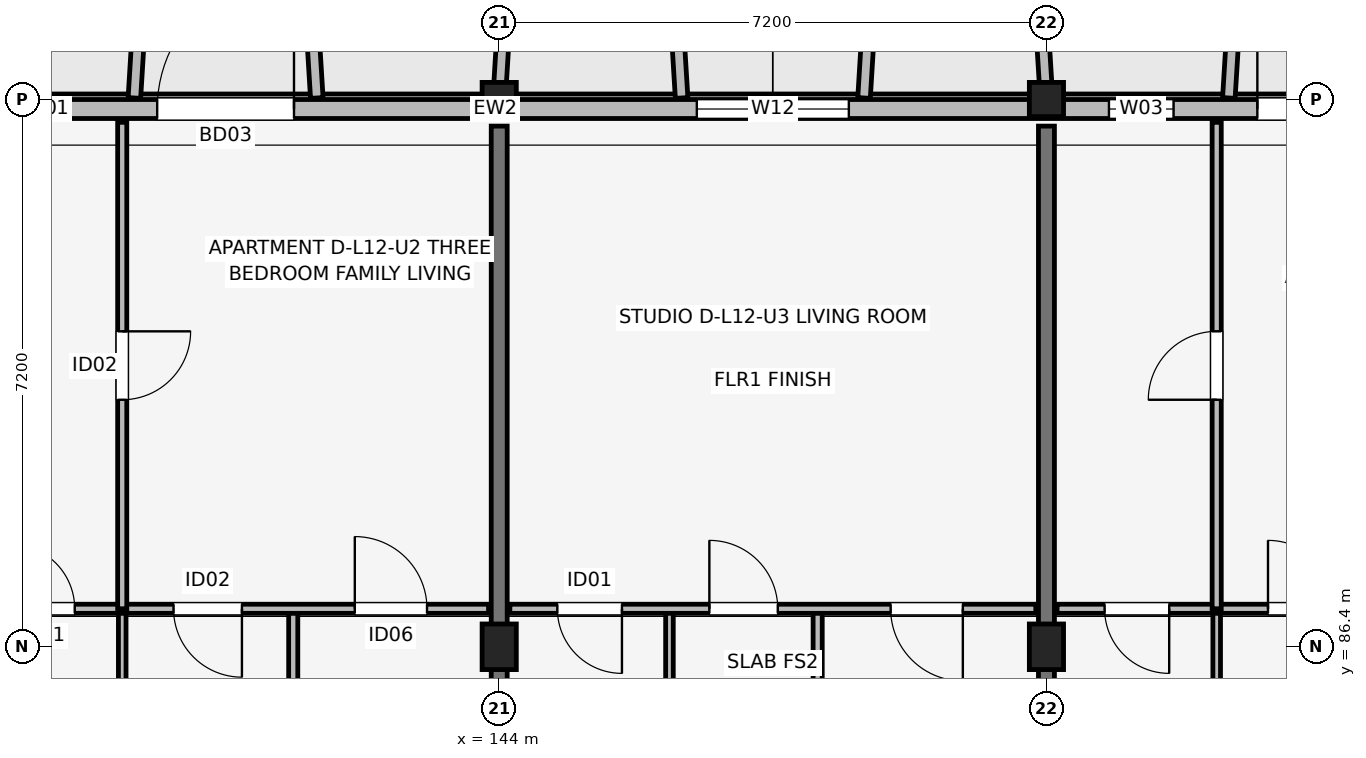
"""IFC4 building model, lengths in metres.
Left out: names, types, materials, properties, quantities, classifications, styles, units other than length and angle.
Written with IfcOpenShell. Run it as: python <this file> out.ifc"""

import sys

from ifc_helpers import new_model, si_unit, direction, frame, frame_2d, origin, origin_2d, place, context, subcontext, project, spatial, rectangle, extrude, element, fill, save


model = new_model("IFC4")
c1 = context("Model", 3, precision=1e-05, world=origin(), true_north=direction((0.0, 1.0)))
c2 = subcontext(c1, "Body", "Model", "MODEL_VIEW")
j1 = project(units=[si_unit("LENGTHUNIT", "METRE"), si_unit("PLANEANGLEUNIT", "RADIAN")], contexts=[c1])
p1 = place(None, origin())
s1 = spatial("IfcSite", under=j1, at=p1, CompositionType="ELEMENT")
p2 = place(p1, origin())
s2 = spatial("IfcBuilding", under=s1, at=p2, CompositionType="ELEMENT")
p3 = place(p2, frame((0.0, 0.0, 40.2)))
s3 = spatial("IfcBuildingStorey", under=s2, at=p3, CompositionType="ELEMENT", Elevation=40.2)
p4 = place(p3, frame((144.0, 86.4, 0.0), z_axis=(0.0, 0.0, 1.0), x_axis=(1.0, 0.0, 0.0)))
e1 = element("IfcColumn", 1, at=p4, inside=s3, PredefinedType="COLUMN", context=c2, shape_type="SweptSolid", body=[
    extrude(rectangle(XDim=0.45, YDim=0.6, at=origin_2d()), origin(), (0.0, 0.0, 1.0), 3.15),
])
p5 = place(p3, frame((144.0, 93.6, 0.0), z_axis=(0.0, 0.0, 1.0), x_axis=(1.0, 0.0, 0.0)))
e2 = element("IfcColumn", 2, at=p5, inside=s3, PredefinedType="COLUMN", context=c2, shape_type="SweptSolid", body=[
    extrude(rectangle(XDim=0.45, YDim=0.45, at=origin_2d()), origin(), (0.0, 0.0, 1.0), 3.15),
])
p6 = place(p3, frame((151.2, 86.4, 0.0), z_axis=(0.0, 0.0, 1.0), x_axis=(1.0, 0.0, 0.0)))
e3 = element("IfcColumn", 3, at=p6, inside=s3, PredefinedType="COLUMN", context=c2, shape_type="SweptSolid", body=[
    extrude(rectangle(XDim=0.45, YDim=0.6, at=origin_2d()), origin(), (0.0, 0.0, 1.0), 3.15),
])
p7 = place(p3, frame((151.2, 93.6, 0.0), z_axis=(0.0, 0.0, 1.0), x_axis=(1.0, 0.0, 0.0)))
e4 = element("IfcColumn", 4, at=p7, inside=s3, PredefinedType="COLUMN", context=c2, shape_type="SweptSolid", body=[
    extrude(rectangle(XDim=0.45, YDim=0.45, at=origin_2d()), origin(), (0.0, 0.0, 1.0), 3.15),
])
for number, where, z_axis, x_axis in (
    (5, (144.0, 83.85, 0.0), (0.0, 0.0, 1.0), (0.0, 1.0, 0.0)),
    (6, (151.2, 83.85, 0.0), (0.0, 0.0, 1.0), (0.0, 1.0, 0.0)),
):
    element("IfcWall", number, at=place(p3, frame(where, z_axis=z_axis, x_axis=x_axis)), inside=s3, PredefinedType="SHEAR", context=c2, shape_type="SweptSolid", body=[
        extrude(rectangle(XDim=9.4, YDim=0.21, at=frame_2d((4.7, 0.0))), origin(), (0.0, 0.0, 1.0), 3.15),
    ])
p8 = place(p3, frame((162.8, 93.475, 0.0), z_axis=(0.0, 0.0, 1.0), x_axis=(-1.0, 0.0, 0.0)))
e7 = element("IfcWall", 7, at=p8, inside=s3, PredefinedType="SOLIDWALL", context=c2, shape_type="SweptSolid", body=[
    extrude(rectangle(XDim=30.4, YDim=0.25, at=frame_2d((15.2, 0.0))), origin(), (0.0, 0.0, 1.0), 2.48),
])
p9 = place(p8, frame((23.3, 0.0, 0.0), z_axis=(0.0, 0.0, 1.0), x_axis=(-1.0, 0.0, 0.0)))
e8 = element("IfcOpeningElement", 8, at=p9, cuts=e7, PredefinedType="OPENING", context=c2, shape_type="SweptSolid", body=[
    extrude(rectangle(XDim=1.8, YDim=2.15, at=frame_2d((0.9, 1.075))), frame((0.0, 0.135, 0.0), z_axis=(0.0, -1.0, 0.0), x_axis=(1.0, 0.0, 0.0)), (0.0, 0.0, 1.0), 0.27),
])
p10 = place(p8, frame((8.825, 0.0, 0.0), z_axis=(0.0, 0.0, 1.0), x_axis=(-1.0, 0.0, 0.0)))
e9 = element("IfcOpeningElement", 9, at=p10, cuts=e7, PredefinedType="OPENING", context=c2, shape_type="SweptSolid", body=[
    extrude(rectangle(XDim=1.65, YDim=2.15, at=frame_2d((0.825, 1.075))), frame((0.0, 0.135, 0.0), z_axis=(0.0, -1.0, 0.0), x_axis=(1.0, 0.0, 0.0)), (0.0, 0.0, 1.0), 0.27),
])
p11 = place(p8, frame((26.603, 0.0, 0.75)))
e10 = element("IfcOpeningElement", 10, at=p11, cuts=e7, PredefinedType="OPENING", context=c2, shape_type="SweptSolid", body=[
    extrude(rectangle(XDim=1.46, YDim=1.55, at=frame_2d((0.73, 0.775))), frame((0.0, 0.135, 0.0), z_axis=(0.0, -1.0, 0.0), x_axis=(1.0, 0.0, 0.0)), (0.0, 0.0, 1.0), 0.27),
])
p12 = place(p8, frame((24.452, 0.0, 0.75)))
e11 = element("IfcOpeningElement", 11, at=p12, cuts=e7, PredefinedType="OPENING", context=c2, shape_type="SweptSolid", body=[
    extrude(rectangle(XDim=0.6, YDim=1.25, at=frame_2d((0.3, 0.625))), frame((0.0, 0.135, 0.0), z_axis=(0.0, -1.0, 0.0), x_axis=(1.0, 0.0, 0.0)), (0.0, 0.0, 1.0), 0.27),
])
p13 = place(p8, frame((14.2, 0.0, 0.7)))
e12 = element("IfcOpeningElement", 12, at=p13, cuts=e7, PredefinedType="OPENING", context=c2, shape_type="SweptSolid", body=[
    extrude(rectangle(XDim=2.0, YDim=1.65, at=frame_2d((1.0, 0.825))), frame((0.0, 0.135, 0.0), z_axis=(0.0, -1.0, 0.0), x_axis=(1.0, 0.0, 0.0)), (0.0, 0.0, 1.0), 0.27),
])
p14 = place(p8, frame((9.927, 0.0, 0.75)))
e13 = element("IfcOpeningElement", 13, at=p14, cuts=e7, PredefinedType="OPENING", context=c2, shape_type="SweptSolid", body=[
    extrude(rectangle(XDim=0.85, YDim=1.4, at=frame_2d((0.425, 0.7))), frame((0.0, 0.135, 0.0), z_axis=(0.0, -1.0, 0.0), x_axis=(1.0, 0.0, 0.0)), (0.0, 0.0, 1.0), 0.27),
])
p15 = place(p8, frame((2.137, 0.0, 0.7)))
e14 = element("IfcOpeningElement", 14, at=p15, cuts=e7, PredefinedType="OPENING", context=c2, shape_type="SweptSolid", body=[
    extrude(rectangle(XDim=1.86, YDim=1.6, at=frame_2d((0.93, 0.8))), frame((0.0, 0.135, 0.0), z_axis=(0.0, -1.0, 0.0), x_axis=(1.0, 0.0, 0.0)), (0.0, 0.0, 1.0), 0.27),
])
for number, where, z_axis, x_axis in (
    (15, (139.2, 93.62, 0.0), (0.0, 0.0, 1.0), (0.061, 0.998, 0.0)),
    (16, (141.6, 93.62, 0.0), (0.0, 0.0, 1.0), (-0.061, 0.998, 0.0)),
):
    element("IfcWall", number, at=place(p3, frame(where, z_axis=z_axis, x_axis=x_axis)), inside=s3, PredefinedType="ELEMENTEDWALL", context=c2, shape_type="SweptSolid", body=[
        extrude(rectangle(XDim=1.964, YDim=0.165, at=frame_2d((0.982, 0.0))), origin(), (0.0, 0.0, 1.0), 2.58),
    ])
for number, where, z_axis, x_axis in (
    (17, (144.0, 93.62, 0.0), (0.0, 0.0, 1.0), (0.061, 0.998, 0.0)),
    (18, (146.4, 93.62, 0.0), (0.0, 0.0, 1.0), (-0.061, 0.998, 0.0)),
    (19, (148.8, 93.62, 0.0), (0.0, 0.0, 1.0), (0.061, 0.998, 0.0)),
    (20, (151.2, 93.62, 0.0), (0.0, 0.0, 1.0), (-0.061, 0.998, 0.0)),
):
    element("IfcWall", number, at=place(p3, frame(where, z_axis=z_axis, x_axis=x_axis)), inside=s3, PredefinedType="ELEMENTEDWALL", context=c2, shape_type="SweptSolid", body=[
        extrude(rectangle(XDim=1.964, YDim=0.165, at=frame_2d((0.982, 0.0))), origin(), (0.0, 0.0, 1.0), 2.53),
    ])
p16 = place(p3, frame((153.6, 93.62, 0.0), z_axis=(0.0, 0.0, 1.0), x_axis=(0.061046865508, 0.998134900808, 0.0)))
e21 = element("IfcWall", 21, at=p16, inside=s3, PredefinedType="ELEMENTEDWALL", context=c2, shape_type="SweptSolid", body=[
    extrude(rectangle(XDim=1.964, YDim=0.165, at=frame_2d((0.982, 0.0))), origin(), (0.0, 0.0, 1.0), 2.48),
])
p17 = place(p3, frame((139.04, 83.7, 0.0), z_axis=(0.0, 0.0, 1.0), x_axis=(0.0, 1.0, 0.0)))
e22 = element("IfcWall", 22, at=p17, inside=s3, PredefinedType="PARTITIONING", context=c2, shape_type="SweptSolid", body=[
    extrude(rectangle(XDim=3.2, YDim=0.1, at=frame_2d((1.6, 0.0))), origin(), (0.0, 0.0, 1.0), 2.38),
])
p18 = place(p3, frame((141.29, 83.7, 0.0), z_axis=(0.0, 0.0, 1.0), x_axis=(0.0, 1.0, 0.0)))
e23 = element("IfcWall", 23, at=p18, inside=s3, PredefinedType="PARTITIONING", context=c2, shape_type="SweptSolid", body=[
    extrude(rectangle(XDim=3.2, YDim=0.12, at=frame_2d((1.6, 0.0))), origin(), (0.0, 0.0, 1.0), 2.38),
])
p19 = place(p3, frame((136.94, 86.9, 0.0), z_axis=(0.0, 0.0, 1.0), x_axis=(1.0, 0.0, 0.0)))
e24 = element("IfcWall", 24, at=p19, inside=s3, PredefinedType="PARTITIONING", context=c2, shape_type="SweptSolid", body=[
    extrude(rectangle(XDim=6.92, YDim=0.12, at=frame_2d((3.46, 0.0))), origin(), (0.0, 0.0, 1.0), 2.38),
])
p20 = place(p19, frame((0.625, 0.0, 0.0)))
e25 = element("IfcOpeningElement", 25, at=p20, cuts=e24, PredefinedType="OPENING", context=c2, shape_type="SweptSolid", body=[
    extrude(rectangle(XDim=0.85, YDim=2.08, at=frame_2d((0.425, 1.04))), frame((0.0, 0.07, 0.0), z_axis=(0.0, -1.0, 0.0), x_axis=(1.0, 0.0, 0.0)), (0.0, 0.0, 1.0), 0.14),
])
p21 = place(p19, frame((3.675, 0.0, 0.0), z_axis=(0.0, 0.0, 1.0), x_axis=(-1.0, 0.0, 0.0)))
e26 = element("IfcOpeningElement", 26, at=p21, cuts=e24, PredefinedType="OPENING", context=c2, shape_type="SweptSolid", body=[
    extrude(rectangle(XDim=0.9, YDim=2.08, at=frame_2d((0.45, 1.04))), frame((0.0, 0.07, 0.0), z_axis=(0.0, -1.0, 0.0), x_axis=(1.0, 0.0, 0.0)), (0.0, 0.0, 1.0), 0.14),
])
p22 = place(p19, frame((5.16, 0.0, 0.0)))
e27 = element("IfcOpeningElement", 27, at=p22, cuts=e24, PredefinedType="OPENING", context=c2, shape_type="SweptSolid", body=[
    extrude(rectangle(XDim=0.95, YDim=2.08, at=frame_2d((0.475, 1.04))), frame((0.0, 0.07, 0.0), z_axis=(0.0, -1.0, 0.0), x_axis=(1.0, 0.0, 0.0)), (0.0, 0.0, 1.0), 0.14),
])
p23 = place(p3, frame((139.04, 86.9, 0.0), z_axis=(0.0, 0.0, 1.0), x_axis=(0.0, 1.0, 0.0)))
e28 = element("IfcWall", 28, at=p23, inside=s3, PredefinedType="PARTITIONING", context=c2, shape_type="SweptSolid", body=[
    extrude(rectangle(XDim=6.4, YDim=0.12, at=frame_2d((3.2, 0.0))), origin(), (0.0, 0.0, 1.0), 2.38),
])
p24 = place(p23, frame((3.65, 0.0, 0.0), z_axis=(0.0, 0.0, 1.0), x_axis=(-1.0, 0.0, 0.0)))
e29 = element("IfcOpeningElement", 29, at=p24, cuts=e28, PredefinedType="OPENING", context=c2, shape_type="SweptSolid", body=[
    extrude(rectangle(XDim=0.9, YDim=2.08, at=frame_2d((0.45, 1.04))), frame((0.0, 0.07, 0.0), z_axis=(0.0, -1.0, 0.0), x_axis=(1.0, 0.0, 0.0)), (0.0, 0.0, 1.0), 0.14),
])
p25 = place(p3, frame((146.24, 83.7, 0.0), z_axis=(0.0, 0.0, 1.0), x_axis=(0.0, 1.0, 0.0)))
e30 = element("IfcWall", 30, at=p25, inside=s3, PredefinedType="PARTITIONING", context=c2, shape_type="SweptSolid", body=[
    extrude(rectangle(XDim=3.2, YDim=0.1, at=frame_2d((1.6, 0.0))), origin(), (0.0, 0.0, 1.0), 2.38),
])
p26 = place(p3, frame((148.19, 83.7, 0.0), z_axis=(0.0, 0.0, 1.0), x_axis=(0.0, 1.0, 0.0)))
e31 = element("IfcWall", 31, at=p26, inside=s3, PredefinedType="PARTITIONING", context=c2, shape_type="SweptSolid", body=[
    extrude(rectangle(XDim=3.2, YDim=0.12, at=frame_2d((1.6, 0.0))), origin(), (0.0, 0.0, 1.0), 2.38),
])
p27 = place(p3, frame((144.14, 86.9, 0.0), z_axis=(0.0, 0.0, 1.0), x_axis=(1.0, 0.0, 0.0)))
e32 = element("IfcWall", 32, at=p27, inside=s3, PredefinedType="PARTITIONING", context=c2, shape_type="SweptSolid", body=[
    extrude(rectangle(XDim=6.92, YDim=0.12, at=frame_2d((3.46, 0.0))), origin(), (0.0, 0.0, 1.0), 2.38),
])
p28 = place(p27, frame((1.475, 0.0, 0.0), z_axis=(0.0, 0.0, 1.0), x_axis=(-1.0, 0.0, 0.0)))
e33 = element("IfcOpeningElement", 33, at=p28, cuts=e32, PredefinedType="OPENING", context=c2, shape_type="SweptSolid", body=[
    extrude(rectangle(XDim=0.85, YDim=2.08, at=frame_2d((0.425, 1.04))), frame((0.0, 0.07, 0.0), z_axis=(0.0, -1.0, 0.0), x_axis=(1.0, 0.0, 0.0)), (0.0, 0.0, 1.0), 0.14),
])
p29 = place(p27, frame((2.625, 0.0, 0.0)))
e34 = element("IfcOpeningElement", 34, at=p29, cuts=e32, PredefinedType="OPENING", context=c2, shape_type="SweptSolid", body=[
    extrude(rectangle(XDim=0.9, YDim=2.08, at=frame_2d((0.45, 1.04))), frame((0.0, 0.07, 0.0), z_axis=(0.0, -1.0, 0.0), x_axis=(1.0, 0.0, 0.0)), (0.0, 0.0, 1.0), 0.14),
])
p30 = place(p27, frame((5.96, 0.0, 0.0), z_axis=(0.0, 0.0, 1.0), x_axis=(-1.0, 0.0, 0.0)))
e35 = element("IfcOpeningElement", 35, at=p30, cuts=e32, PredefinedType="OPENING", context=c2, shape_type="SweptSolid", body=[
    extrude(rectangle(XDim=0.95, YDim=2.08, at=frame_2d((0.475, 1.04))), frame((0.0, 0.07, 0.0), z_axis=(0.0, -1.0, 0.0), x_axis=(1.0, 0.0, 0.0)), (0.0, 0.0, 1.0), 0.14),
])
p31 = place(p3, frame((153.44, 83.7, 0.0), z_axis=(0.0, 0.0, 1.0), x_axis=(0.0, 1.0, 0.0)))
e36 = element("IfcWall", 36, at=p31, inside=s3, PredefinedType="PARTITIONING", context=c2, shape_type="SweptSolid", body=[
    extrude(rectangle(XDim=3.2, YDim=0.1, at=frame_2d((1.6, 0.0))), origin(), (0.0, 0.0, 1.0), 2.38),
])
p32 = place(p3, frame((151.34, 86.9, 0.0), z_axis=(0.0, 0.0, 1.0), x_axis=(1.0, 0.0, 0.0)))
e37 = element("IfcWall", 37, at=p32, inside=s3, PredefinedType="PARTITIONING", context=c2, shape_type="SweptSolid", body=[
    extrude(rectangle(XDim=6.92, YDim=0.12, at=frame_2d((3.46, 0.0))), origin(), (0.0, 0.0, 1.0), 2.38),
])
p33 = place(p32, frame((1.475, 0.0, 0.0), z_axis=(0.0, 0.0, 1.0), x_axis=(-1.0, 0.0, 0.0)))
e38 = element("IfcOpeningElement", 38, at=p33, cuts=e37, PredefinedType="OPENING", context=c2, shape_type="SweptSolid", body=[
    extrude(rectangle(XDim=0.85, YDim=2.08, at=frame_2d((0.425, 1.04))), frame((0.0, 0.07, 0.0), z_axis=(0.0, -1.0, 0.0), x_axis=(1.0, 0.0, 0.0)), (0.0, 0.0, 1.0), 0.14),
])
p34 = place(p32, frame((2.775, 0.0, 0.0)))
e39 = element("IfcOpeningElement", 39, at=p34, cuts=e37, PredefinedType="OPENING", context=c2, shape_type="SweptSolid", body=[
    extrude(rectangle(XDim=0.9, YDim=2.08, at=frame_2d((0.45, 1.04))), frame((0.0, 0.07, 0.0), z_axis=(0.0, -1.0, 0.0), x_axis=(1.0, 0.0, 0.0)), (0.0, 0.0, 1.0), 0.14),
])
p35 = place(p32, frame((6.11, 0.0, 0.0), z_axis=(0.0, 0.0, 1.0), x_axis=(-1.0, 0.0, 0.0)))
e40 = element("IfcOpeningElement", 40, at=p35, cuts=e37, PredefinedType="OPENING", context=c2, shape_type="SweptSolid", body=[
    extrude(rectangle(XDim=0.95, YDim=2.08, at=frame_2d((0.475, 1.04))), frame((0.0, 0.07, 0.0), z_axis=(0.0, -1.0, 0.0), x_axis=(1.0, 0.0, 0.0)), (0.0, 0.0, 1.0), 0.14),
])
p36 = place(p3, frame((153.44, 86.9, 0.0), z_axis=(0.0, 0.0, 1.0), x_axis=(0.0, 1.0, 0.0)))
e41 = element("IfcWall", 41, at=p36, inside=s3, PredefinedType="PARTITIONING", context=c2, shape_type="SweptSolid", body=[
    extrude(rectangle(XDim=6.4, YDim=0.12, at=frame_2d((3.2, 0.0))), origin(), (0.0, 0.0, 1.0), 2.38),
])
p37 = place(p36, frame((2.75, 0.0, 0.0)))
e42 = element("IfcOpeningElement", 42, at=p37, cuts=e41, PredefinedType="OPENING", context=c2, shape_type="SweptSolid", body=[
    extrude(rectangle(XDim=0.9, YDim=2.08, at=frame_2d((0.45, 1.04))), frame((0.0, 0.07, 0.0), z_axis=(0.0, -1.0, 0.0), x_axis=(1.0, 0.0, 0.0)), (0.0, 0.0, 1.0), 0.14),
])
p38 = place(p9, origin())
e43 = element("IfcDoor", 43, at=p38, inside=s3, OperationType="SINGLE_SWING_LEFT", PredefinedType="DOOR", context=c2, shape_type="SweptSolid", body=[
    extrude(rectangle(XDim=1.8, YDim=2.15, at=frame_2d((0.9, 1.075))), frame((0.0, 0.025, 0.0), z_axis=(0.0, -1.0, 0.0), x_axis=(1.0, 0.0, 0.0)), (0.0, 0.0, 1.0), 0.05),
])
fill(e8, e43)
p39 = place(p10, origin())
e44 = element("IfcDoor", 44, at=p39, inside=s3, OperationType="SINGLE_SWING_RIGHT", PredefinedType="DOOR", context=c2, shape_type="SweptSolid", body=[
    extrude(rectangle(XDim=1.65, YDim=2.15, at=frame_2d((0.825, 1.075))), frame((0.0, 0.025, 0.0), z_axis=(0.0, -1.0, 0.0), x_axis=(1.0, 0.0, 0.0)), (0.0, 0.0, 1.0), 0.05),
])
fill(e9, e44)
p40 = place(p12, origin())
e45 = element("IfcWindow", 45, at=p40, inside=s3, PartitioningType="SINGLE_PANEL", PredefinedType="WINDOW", context=c2, shape_type="SweptSolid", body=[
    extrude(rectangle(XDim=0.6, YDim=1.25, at=frame_2d((0.3, 0.625))), frame((0.0, 0.03, 0.0), z_axis=(0.0, -1.0, 0.0), x_axis=(1.0, 0.0, 0.0)), (0.0, 0.0, 1.0), 0.06),
])
fill(e11, e45)
p41 = place(p13, origin())
e46 = element("IfcWindow", 46, at=p41, inside=s3, PartitioningType="SINGLE_PANEL", PredefinedType="WINDOW", context=c2, shape_type="SweptSolid", body=[
    extrude(rectangle(XDim=2.0, YDim=1.65, at=frame_2d((1.0, 0.825))), frame((0.0, 0.03, 0.0), z_axis=(0.0, -1.0, 0.0), x_axis=(1.0, 0.0, 0.0)), (0.0, 0.0, 1.0), 0.06),
])
fill(e12, e46)
p42 = place(p14, origin())
e47 = element("IfcWindow", 47, at=p42, inside=s3, PartitioningType="SINGLE_PANEL", PredefinedType="WINDOW", context=c2, shape_type="SweptSolid", body=[
    extrude(rectangle(XDim=0.85, YDim=1.4, at=frame_2d((0.425, 0.7))), frame((0.0, 0.03, 0.0), z_axis=(0.0, -1.0, 0.0), x_axis=(1.0, 0.0, 0.0)), (0.0, 0.0, 1.0), 0.06),
])
fill(e13, e47)
p43 = place(p20, origin())
e48 = element("IfcDoor", 48, at=p43, inside=s3, OperationType="SINGLE_SWING_LEFT", PredefinedType="DOOR", context=c2, shape_type="SweptSolid", body=[
    extrude(rectangle(XDim=0.85, YDim=2.08, at=frame_2d((0.425, 1.04))), frame((0.0, 0.025, 0.0), z_axis=(0.0, -1.0, 0.0), x_axis=(1.0, 0.0, 0.0)), (0.0, 0.0, 1.0), 0.05),
])
fill(e25, e48)
p44 = place(p21, origin())
e49 = element("IfcDoor", 49, at=p44, inside=s3, OperationType="SINGLE_SWING_RIGHT", PredefinedType="DOOR", context=c2, shape_type="SweptSolid", body=[
    extrude(rectangle(XDim=0.9, YDim=2.08, at=frame_2d((0.45, 1.04))), frame((0.0, 0.025, 0.0), z_axis=(0.0, -1.0, 0.0), x_axis=(1.0, 0.0, 0.0)), (0.0, 0.0, 1.0), 0.05),
])
fill(e26, e49)
p45 = place(p22, origin())
e50 = element("IfcDoor", 50, at=p45, inside=s3, OperationType="SINGLE_SWING_LEFT", PredefinedType="DOOR", context=c2, shape_type="SweptSolid", body=[
    extrude(rectangle(XDim=0.95, YDim=2.08, at=frame_2d((0.475, 1.04))), frame((0.0, 0.025, 0.0), z_axis=(0.0, -1.0, 0.0), x_axis=(1.0, 0.0, 0.0)), (0.0, 0.0, 1.0), 0.05),
])
fill(e27, e50)
p46 = place(p24, origin())
e51 = element("IfcDoor", 51, at=p46, inside=s3, OperationType="SINGLE_SWING_RIGHT", PredefinedType="DOOR", context=c2, shape_type="SweptSolid", body=[
    extrude(rectangle(XDim=0.9, YDim=2.08, at=frame_2d((0.45, 1.04))), frame((0.0, 0.025, 0.0), z_axis=(0.0, -1.0, 0.0), x_axis=(1.0, 0.0, 0.0)), (0.0, 0.0, 1.0), 0.05),
])
fill(e29, e51)
p47 = place(p28, origin())
e52 = element("IfcDoor", 52, at=p47, inside=s3, OperationType="SINGLE_SWING_RIGHT", PredefinedType="DOOR", context=c2, shape_type="SweptSolid", body=[
    extrude(rectangle(XDim=0.85, YDim=2.08, at=frame_2d((0.425, 1.04))), frame((0.0, 0.025, 0.0), z_axis=(0.0, -1.0, 0.0), x_axis=(1.0, 0.0, 0.0)), (0.0, 0.0, 1.0), 0.05),
])
fill(e33, e52)
p48 = place(p29, origin())
e53 = element("IfcDoor", 53, at=p48, inside=s3, OperationType="SINGLE_SWING_LEFT", PredefinedType="DOOR", context=c2, shape_type="SweptSolid", body=[
    extrude(rectangle(XDim=0.9, YDim=2.08, at=frame_2d((0.45, 1.04))), frame((0.0, 0.025, 0.0), z_axis=(0.0, -1.0, 0.0), x_axis=(1.0, 0.0, 0.0)), (0.0, 0.0, 1.0), 0.05),
])
fill(e34, e53)
p49 = place(p30, origin())
e54 = element("IfcDoor", 54, at=p49, inside=s3, OperationType="SINGLE_SWING_RIGHT", PredefinedType="DOOR", context=c2, shape_type="SweptSolid", body=[
    extrude(rectangle(XDim=0.95, YDim=2.08, at=frame_2d((0.475, 1.04))), frame((0.0, 0.025, 0.0), z_axis=(0.0, -1.0, 0.0), x_axis=(1.0, 0.0, 0.0)), (0.0, 0.0, 1.0), 0.05),
])
fill(e35, e54)
p50 = place(p33, origin())
e55 = element("IfcDoor", 55, at=p50, inside=s3, OperationType="SINGLE_SWING_RIGHT", PredefinedType="DOOR", context=c2, shape_type="SweptSolid", body=[
    extrude(rectangle(XDim=0.85, YDim=2.08, at=frame_2d((0.425, 1.04))), frame((0.0, 0.025, 0.0), z_axis=(0.0, -1.0, 0.0), x_axis=(1.0, 0.0, 0.0)), (0.0, 0.0, 1.0), 0.05),
])
fill(e38, e55)
p51 = place(p34, origin())
e56 = element("IfcDoor", 56, at=p51, inside=s3, OperationType="SINGLE_SWING_LEFT", PredefinedType="DOOR", context=c2, shape_type="SweptSolid", body=[
    extrude(rectangle(XDim=0.9, YDim=2.08, at=frame_2d((0.45, 1.04))), frame((0.0, 0.025, 0.0), z_axis=(0.0, -1.0, 0.0), x_axis=(1.0, 0.0, 0.0)), (0.0, 0.0, 1.0), 0.05),
])
fill(e39, e56)
p52 = place(p37, origin())
e57 = element("IfcDoor", 57, at=p52, inside=s3, OperationType="SINGLE_SWING_LEFT", PredefinedType="DOOR", context=c2, shape_type="SweptSolid", body=[
    extrude(rectangle(XDim=0.9, YDim=2.08, at=frame_2d((0.45, 1.04))), frame((0.0, 0.025, 0.0), z_axis=(0.0, -1.0, 0.0), x_axis=(1.0, 0.0, 0.0)), (0.0, 0.0, 1.0), 0.05),
])
fill(e42, e57)
save(model, sys.argv[1])
